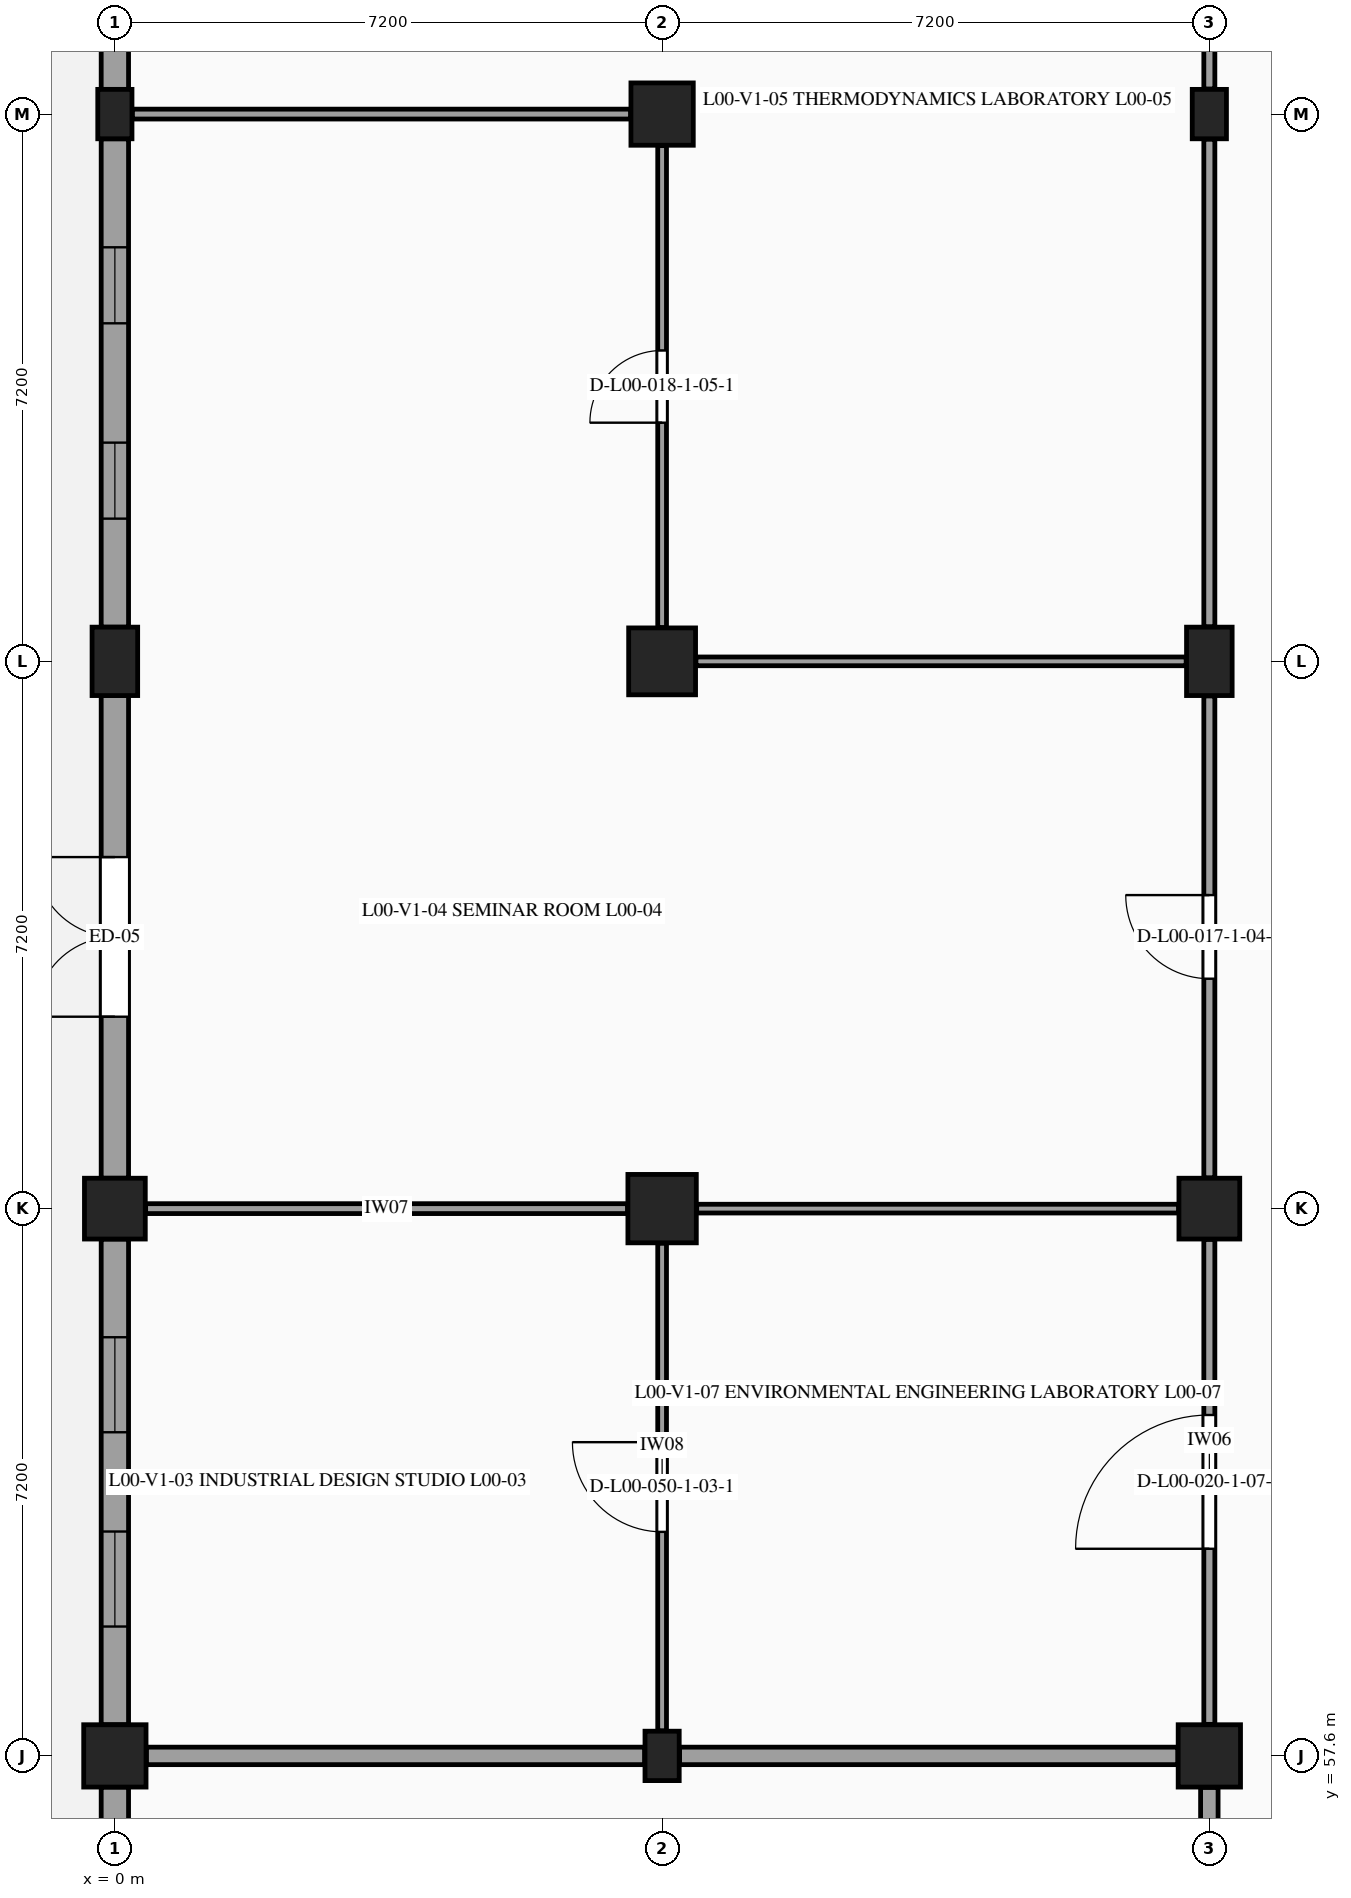
"""IFC4 building model, lengths in metres.
Left out: names, types, materials, properties, quantities, classifications, styles, units other than length and angle.
Written with IfcOpenShell. Run it as: python <this file> out.ifc"""

import sys

from ifc_helpers import new_model, si_unit, direction, frame, frame_2d, origin, origin_2d, place, context, subcontext, project, spatial, rectangle, extrude, element, fill, save


model = new_model("IFC4")
c1 = context("Model", 3, precision=1e-05, world=origin(), true_north=direction((0.0, 1.0)))
c2 = subcontext(c1, "Body", "Model", "MODEL_VIEW")
j1 = project(units=[si_unit("LENGTHUNIT", "METRE"), si_unit("PLANEANGLEUNIT", "RADIAN")], contexts=[c1])
p1 = place(None, origin())
s1 = spatial("IfcSite", under=j1, at=p1, CompositionType="ELEMENT")
p2 = place(p1, origin())
s2 = spatial("IfcBuilding", under=s1, at=p2, CompositionType="ELEMENT")
p3 = place(p2, origin())
s3 = spatial("IfcBuildingStorey", under=s2, at=p3, CompositionType="ELEMENT", Elevation=0.0)
p4 = place(p3, frame((0.0, 57.6, 0.0), z_axis=(0.0, 0.0, 1.0), x_axis=(1.0, 0.0, 0.0)))
e1 = element("IfcColumn", 1, at=p4, inside=s3, PredefinedType="COLUMN", context=c2, shape_type="SweptSolid", body=[
    extrude(rectangle(XDim=0.82, YDim=0.82, at=origin_2d()), origin(), (0.0, 0.0, 1.0), 5.4),
])
p5 = place(p3, frame((0.0, 64.8, 0.0), z_axis=(0.0, 0.0, 1.0), x_axis=(1.0, 0.0, 0.0)))
e2 = element("IfcColumn", 2, at=p5, inside=s3, PredefinedType="COLUMN", context=c2, shape_type="SweptSolid", body=[
    extrude(rectangle(XDim=0.8, YDim=0.8, at=origin_2d()), origin(), (0.0, 0.0, 1.0), 5.4),
])
p6 = place(p3, frame((0.0, 72.0, 0.0), z_axis=(0.0, 0.0, 1.0), x_axis=(1.0, 0.0, 0.0)))
e3 = element("IfcColumn", 3, at=p6, inside=s3, PredefinedType="COLUMN", context=c2, shape_type="SweptSolid", body=[
    extrude(rectangle(XDim=0.6, YDim=0.9, at=origin_2d()), origin(), (0.0, 0.0, 1.0), 5.4),
])
for number, where, z_axis, x_axis in (
    (4, (0.0, 79.2, 0.0), (0.0, 0.0, 1.0), (1.0, 0.0, 0.0)),
    (5, (7.2, 57.6, 0.0), (0.0, 0.0, 1.0), (1.0, 0.0, 0.0)),
):
    element("IfcColumn", number, at=place(p3, frame(where, z_axis=z_axis, x_axis=x_axis)), inside=s3, PredefinedType="PILASTER", context=c2, shape_type="SweptSolid", body=[
        extrude(rectangle(XDim=0.45, YDim=0.65, at=origin_2d()), origin(), (0.0, 0.0, 1.0), 5.4),
    ])
p7 = place(p3, frame((7.2, 64.8, 0.0), z_axis=(0.0, 0.0, 1.0), x_axis=(1.0, 0.0, 0.0)))
e6 = element("IfcColumn", 6, at=p7, inside=s3, PredefinedType="COLUMN", context=c2, shape_type="SweptSolid", body=[
    extrude(rectangle(XDim=0.9, YDim=0.9, at=origin_2d()), origin(), (0.0, 0.0, 1.0), 5.4),
])
p8 = place(p3, frame((7.2, 72.0, 0.0), z_axis=(0.0, 0.0, 1.0), x_axis=(1.0, 0.0, 0.0)))
e7 = element("IfcColumn", 7, at=p8, inside=s3, PredefinedType="COLUMN", context=c2, shape_type="SweptSolid", body=[
    extrude(rectangle(XDim=0.88, YDim=0.88, at=origin_2d()), origin(), (0.0, 0.0, 1.0), 5.4),
])
for number, where, z_axis, x_axis in (
    (8, (7.2, 79.2, 0.0), (0.0, 0.0, 1.0), (1.0, 0.0, 0.0)),
    (9, (14.4, 57.6, 0.0), (0.0, 0.0, 1.0), (1.0, 0.0, 0.0)),
):
    element("IfcColumn", number, at=place(p3, frame(where, z_axis=z_axis, x_axis=x_axis)), inside=s3, PredefinedType="COLUMN", context=c2, shape_type="SweptSolid", body=[
        extrude(rectangle(XDim=0.82, YDim=0.82, at=origin_2d()), origin(), (0.0, 0.0, 1.0), 5.4),
    ])
p9 = place(p3, frame((14.4, 64.8, 0.0), z_axis=(0.0, 0.0, 1.0), x_axis=(1.0, 0.0, 0.0)))
e10 = element("IfcColumn", 10, at=p9, inside=s3, PredefinedType="COLUMN", context=c2, shape_type="SweptSolid", body=[
    extrude(rectangle(XDim=0.8, YDim=0.8, at=origin_2d()), origin(), (0.0, 0.0, 1.0), 5.4),
])
p10 = place(p3, frame((14.4, 72.0, 0.0), z_axis=(0.0, 0.0, 1.0), x_axis=(1.0, 0.0, 0.0)))
e11 = element("IfcColumn", 11, at=p10, inside=s3, PredefinedType="COLUMN", context=c2, shape_type="SweptSolid", body=[
    extrude(rectangle(XDim=0.6, YDim=0.9, at=origin_2d()), origin(), (0.0, 0.0, 1.0), 5.4),
])
p11 = place(p3, frame((14.4, 79.2, 0.0), z_axis=(0.0, 0.0, 1.0), x_axis=(1.0, 0.0, 0.0)))
e12 = element("IfcColumn", 12, at=p11, inside=s3, PredefinedType="PILASTER", context=c2, shape_type="SweptSolid", body=[
    extrude(rectangle(XDim=0.45, YDim=0.65, at=origin_2d()), origin(), (0.0, 0.0, 1.0), 5.4),
])
p12 = place(p3, frame((0.0, 50.84, 0.0), z_axis=(0.0, 0.0, 1.0), x_axis=(0.0, 1.0, 0.0)))
e13 = element("IfcWall", 13, at=p12, inside=s3, PredefinedType="STANDARD", context=c2, shape_type="SweptSolid", body=[
    extrude(rectangle(XDim=6.35, YDim=0.36, at=frame_2d((3.175, 0.0))), origin(), (0.0, 0.0, 1.0), 4.335),
])
p13 = place(p12, frame((2.125, 0.0, 0.0)))
e14 = element("IfcOpeningElement", 14, at=p13, cuts=e13, PredefinedType="OPENING", context=c2, shape_type="SweptSolid", body=[
    extrude(rectangle(XDim=2.1, YDim=2.4, at=frame_2d((1.05, 1.2))), frame((0.0, 0.19, 0.0), z_axis=(0.0, -1.0, 0.0), x_axis=(1.0, 0.0, 0.0)), (0.0, 0.0, 1.0), 0.38),
])
p14 = place(p3, frame((0.0, 58.01, 0.0), z_axis=(0.0, 0.0, 1.0), x_axis=(0.0, 1.0, 0.0)))
e15 = element("IfcWall", 15, at=p14, inside=s3, PredefinedType="STANDARD", context=c2, shape_type="SweptSolid", body=[
    extrude(rectangle(XDim=6.39, YDim=0.36, at=frame_2d((3.195, 0.0))), origin(), (0.0, 0.0, 1.0), 4.335),
])
p15 = place(p14, frame((1.292, 0.0, 1.15)))
e16 = element("IfcOpeningElement", 16, at=p15, cuts=e15, PredefinedType="OPENING", context=c2, shape_type="SweptSolid", body=[
    extrude(rectangle(XDim=1.25, YDim=1.25, at=frame_2d((0.625, 0.625))), frame((0.0, 0.19, 0.0), z_axis=(0.0, -1.0, 0.0), x_axis=(1.0, 0.0, 0.0)), (0.0, 0.0, 1.0), 0.38),
])
p16 = place(p14, frame((3.848, 0.0, 1.15)))
e17 = element("IfcOpeningElement", 17, at=p16, cuts=e15, PredefinedType="OPENING", context=c2, shape_type="SweptSolid", body=[
    extrude(rectangle(XDim=1.25, YDim=1.25, at=frame_2d((0.625, 0.625))), frame((0.0, 0.19, 0.0), z_axis=(0.0, -1.0, 0.0), x_axis=(1.0, 0.0, 0.0)), (0.0, 0.0, 1.0), 0.38),
])
p17 = place(p3, frame((0.0, 65.2, 0.0), z_axis=(0.0, 0.0, 1.0), x_axis=(0.0, 1.0, 0.0)))
e18 = element("IfcWall", 18, at=p17, inside=s3, PredefinedType="STANDARD", context=c2, shape_type="SweptSolid", body=[
    extrude(rectangle(XDim=6.35, YDim=0.36, at=frame_2d((3.175, 0.0))), origin(), (0.0, 0.0, 1.0), 4.335),
])
p18 = place(p17, frame((2.125, 0.0, 0.0)))
e19 = element("IfcOpeningElement", 19, at=p18, cuts=e18, PredefinedType="OPENING", context=c2, shape_type="SweptSolid", body=[
    extrude(rectangle(XDim=2.1, YDim=2.4, at=frame_2d((1.05, 1.2))), frame((0.0, 0.19, 0.0), z_axis=(0.0, -1.0, 0.0), x_axis=(1.0, 0.0, 0.0)), (0.0, 0.0, 1.0), 0.38),
])
p19 = place(p3, frame((0.0, 72.45, 0.0), z_axis=(0.0, 0.0, 1.0), x_axis=(0.0, 1.0, 0.0)))
e20 = element("IfcWall", 20, at=p19, inside=s3, PredefinedType="STANDARD", context=c2, shape_type="SweptSolid", body=[
    extrude(rectangle(XDim=6.425, YDim=0.36, at=frame_2d((3.212, 0.0))), origin(), (0.0, 0.0, 1.0), 4.335),
])
p20 = place(p19, frame((1.427, 0.0, 1.15)))
e21 = element("IfcOpeningElement", 21, at=p20, cuts=e20, PredefinedType="OPENING", context=c2, shape_type="SweptSolid", body=[
    extrude(rectangle(XDim=1.0, YDim=1.2, at=frame_2d((0.5, 0.6))), frame((0.0, 0.19, 0.0), z_axis=(0.0, -1.0, 0.0), x_axis=(1.0, 0.0, 0.0)), (0.0, 0.0, 1.0), 0.38),
])
p21 = place(p19, frame((3.998, 0.0, 1.15)))
e22 = element("IfcOpeningElement", 22, at=p21, cuts=e20, PredefinedType="OPENING", context=c2, shape_type="SweptSolid", body=[
    extrude(rectangle(XDim=1.0, YDim=1.2, at=frame_2d((0.5, 0.6))), frame((0.0, 0.19, 0.0), z_axis=(0.0, -1.0, 0.0), x_axis=(1.0, 0.0, 0.0)), (0.0, 0.0, 1.0), 0.38),
])
p22 = place(p3, frame((0.0, 79.525, 0.0), z_axis=(0.0, 0.0, 1.0), x_axis=(0.0, 1.0, 0.0)))
e23 = element("IfcWall", 23, at=p22, inside=s3, PredefinedType="STANDARD", context=c2, shape_type="SweptSolid", body=[
    extrude(rectangle(XDim=6.425, YDim=0.36, at=frame_2d((3.212, 0.0))), origin(), (0.0, 0.0, 1.0), 4.335),
])
p23 = place(p22, frame((2.163, 0.0, 0.0)))
e24 = element("IfcOpeningElement", 24, at=p23, cuts=e23, PredefinedType="OPENING", context=c2, shape_type="SweptSolid", body=[
    extrude(rectangle(XDim=2.1, YDim=2.4, at=frame_2d((1.05, 1.2))), frame((0.0, 0.19, 0.0), z_axis=(0.0, -1.0, 0.0), x_axis=(1.0, 0.0, 0.0)), (0.0, 0.0, 1.0), 0.38),
])
p24 = place(p3, frame((0.415, 57.6, 0.0), z_axis=(0.0, 0.0, 1.0), x_axis=(1.0, 0.0, 0.0)))
e25 = element("IfcWall", 25, at=p24, inside=s3, PredefinedType="PARTITIONING", context=c2, shape_type="SweptSolid", body=[
    extrude(rectangle(XDim=6.555, YDim=0.23, at=frame_2d((3.277, 0.0))), origin(), (0.0, 0.0, 1.0), 4.31),
])
p25 = place(p3, frame((7.2, 57.93, 0.0), z_axis=(0.0, 0.0, 1.0), x_axis=(0.0, 1.0, 0.0)))
e26 = element("IfcWall", 26, at=p25, inside=s3, PredefinedType="PARTITIONING", context=c2, shape_type="SweptSolid", body=[
    extrude(rectangle(XDim=6.415, YDim=0.115, at=frame_2d((3.208, 0.0))), origin(), (0.0, 0.0, 1.0), 4.405),
])
p26 = place(p25, frame((2.617, 0.0, 0.0)))
e27 = element("IfcOpeningElement", 27, at=p26, cuts=e26, PredefinedType="OPENING", context=c2, shape_type="SweptSolid", body=[
    extrude(rectangle(XDim=1.18, YDim=2.18, at=frame_2d((0.59, 1.09))), frame((0.0, 0.067, 0.0), z_axis=(0.0, -1.0, 0.0), x_axis=(1.0, 0.0, 0.0)), (0.0, 0.0, 1.0), 0.135),
])
p27 = place(p3, frame((0.405, 64.8, 0.0), z_axis=(0.0, 0.0, 1.0), x_axis=(1.0, 0.0, 0.0)))
e28 = element("IfcWall", 28, at=p27, inside=s3, PredefinedType="PARTITIONING", context=c2, shape_type="SweptSolid", body=[
    extrude(rectangle(XDim=6.34, YDim=0.13, at=frame_2d((3.17, 0.0))), origin(), (0.0, 0.0, 1.0), 4.31),
])
p28 = place(p3, frame((7.2, 72.445, 0.0), z_axis=(0.0, 0.0, 1.0), x_axis=(0.0, 1.0, 0.0)))
e29 = element("IfcWall", 29, at=p28, inside=s3, PredefinedType="PARTITIONING", context=c2, shape_type="SweptSolid", body=[
    extrude(rectangle(XDim=6.34, YDim=0.115, at=frame_2d((3.17, 0.0))), origin(), (0.0, 0.0, 1.0), 4.4),
])
p29 = place(p28, frame((2.695, 0.0, 0.0)))
e30 = element("IfcOpeningElement", 30, at=p29, cuts=e29, PredefinedType="OPENING", context=c2, shape_type="SweptSolid", body=[
    extrude(rectangle(XDim=0.95, YDim=2.15, at=frame_2d((0.475, 1.075))), frame((0.0, 0.067, 0.0), z_axis=(0.0, -1.0, 0.0), x_axis=(1.0, 0.0, 0.0)), (0.0, 0.0, 1.0), 0.135),
])
p30 = place(p3, frame((0.23, 79.2, 0.0), z_axis=(0.0, 0.0, 1.0), x_axis=(1.0, 0.0, 0.0)))
e31 = element("IfcWall", 31, at=p30, inside=s3, PredefinedType="PARTITIONING", context=c2, shape_type="SweptSolid", body=[
    extrude(rectangle(XDim=6.555, YDim=0.13, at=frame_2d((3.277, 0.0))), origin(), (0.0, 0.0, 1.0), 4.31),
])
p31 = place(p3, frame((14.4, 50.845, 0.0), z_axis=(0.0, 0.0, 1.0), x_axis=(0.0, 1.0, 0.0)))
e32 = element("IfcWall", 32, at=p31, inside=s3, PredefinedType="PARTITIONING", context=c2, shape_type="SweptSolid", body=[
    extrude(rectangle(XDim=6.34, YDim=0.23, at=frame_2d((3.17, 0.0))), origin(), (0.0, 0.0, 1.0), 4.455),
])
p32 = place(p3, frame((7.43, 57.6, 0.0), z_axis=(0.0, 0.0, 1.0), x_axis=(1.0, 0.0, 0.0)))
e33 = element("IfcWall", 33, at=p32, inside=s3, PredefinedType="PARTITIONING", context=c2, shape_type="SweptSolid", body=[
    extrude(rectangle(XDim=6.555, YDim=0.23, at=frame_2d((3.278, 0.0))), origin(), (0.0, 0.0, 1.0), 4.34),
])
p33 = place(p3, frame((14.4, 58.015, 0.0), z_axis=(0.0, 0.0, 1.0), x_axis=(0.0, 1.0, 0.0)))
e34 = element("IfcWall", 34, at=p33, inside=s3, PredefinedType="PARTITIONING", context=c2, shape_type="SweptSolid", body=[
    extrude(rectangle(XDim=6.38, YDim=0.145, at=frame_2d((3.19, 0.0))), origin(), (0.0, 0.0, 1.0), 4.405),
])
p34 = place(p33, frame((2.31, 0.0, 0.0)))
e35 = element("IfcOpeningElement", 35, at=p34, cuts=e34, PredefinedType="OPENING", context=c2, shape_type="SweptSolid", body=[
    extrude(rectangle(XDim=1.76, YDim=2.3, at=frame_2d((0.88, 1.15))), frame((0.0, 0.083, 0.0), z_axis=(0.0, -1.0, 0.0), x_axis=(1.0, 0.0, 0.0)), (0.0, 0.0, 1.0), 0.165),
])
p35 = place(p3, frame((7.655, 64.8, 0.0), z_axis=(0.0, 0.0, 1.0), x_axis=(1.0, 0.0, 0.0)))
e36 = element("IfcWall", 36, at=p35, inside=s3, PredefinedType="PARTITIONING", context=c2, shape_type="SweptSolid", body=[
    extrude(rectangle(XDim=6.34, YDim=0.115, at=frame_2d((3.17, 0.0))), origin(), (0.0, 0.0, 1.0), 4.34),
])
p36 = place(p3, frame((14.4, 65.205, 0.0), z_axis=(0.0, 0.0, 1.0), x_axis=(0.0, 1.0, 0.0)))
e37 = element("IfcWall", 37, at=p36, inside=s3, PredefinedType="PARTITIONING", context=c2, shape_type="SweptSolid", body=[
    extrude(rectangle(XDim=6.34, YDim=0.145, at=frame_2d((3.17, 0.0))), origin(), (0.0, 0.0, 1.0), 4.405),
])
p37 = place(p36, frame((2.62, 0.0, 0.0)))
e38 = element("IfcOpeningElement", 38, at=p37, cuts=e37, PredefinedType="OPENING", context=c2, shape_type="SweptSolid", body=[
    extrude(rectangle(XDim=1.1, YDim=2.15, at=frame_2d((0.55, 1.075))), frame((0.0, 0.083, 0.0), z_axis=(0.0, -1.0, 0.0), x_axis=(1.0, 0.0, 0.0)), (0.0, 0.0, 1.0), 0.165),
])
p38 = place(p3, frame((7.645, 72.0, 0.0), z_axis=(0.0, 0.0, 1.0), x_axis=(1.0, 0.0, 0.0)))
e39 = element("IfcWall", 39, at=p38, inside=s3, PredefinedType="PARTITIONING", context=c2, shape_type="SweptSolid", body=[
    extrude(rectangle(XDim=6.45, YDim=0.115, at=frame_2d((3.225, 0.0))), origin(), (0.0, 0.0, 1.0), 4.34),
])
p39 = place(p3, frame((14.4, 72.455, 0.0), z_axis=(0.0, 0.0, 1.0), x_axis=(0.0, 1.0, 0.0)))
e40 = element("IfcWall", 40, at=p39, inside=s3, PredefinedType="PARTITIONING", context=c2, shape_type="SweptSolid", body=[
    extrude(rectangle(XDim=6.415, YDim=0.145, at=frame_2d((3.208, 0.0))), origin(), (0.0, 0.0, 1.0), 4.4),
])
p40 = place(p3, frame((14.4, 79.53, 0.0), z_axis=(0.0, 0.0, 1.0), x_axis=(0.0, 1.0, 0.0)))
e41 = element("IfcWall", 41, at=p40, inside=s3, PredefinedType="PARTITIONING", context=c2, shape_type="SweptSolid", body=[
    extrude(rectangle(XDim=6.415, YDim=0.145, at=frame_2d((3.208, 0.0))), origin(), (0.0, 0.0, 1.0), 4.395),
])
p41 = place(p15, origin())
e42 = element("IfcWindow", 42, at=p41, inside=s3, PartitioningType="SINGLE_PANEL", PredefinedType="WINDOW", context=c2, shape_type="SweptSolid", body=[
    extrude(rectangle(XDim=1.25, YDim=1.25, at=frame_2d((0.625, 0.625))), frame((0.0, -0.08, 0.0), z_axis=(0.0, -1.0, 0.0), x_axis=(1.0, 0.0, 0.0)), (0.0, 0.0, 1.0), 0.06),
])
fill(e16, e42)
p42 = place(p16, origin())
e43 = element("IfcWindow", 43, at=p42, inside=s3, PartitioningType="SINGLE_PANEL", PredefinedType="WINDOW", context=c2, shape_type="SweptSolid", body=[
    extrude(rectangle(XDim=1.25, YDim=1.25, at=frame_2d((0.625, 0.625))), frame((0.0, -0.08, 0.0), z_axis=(0.0, -1.0, 0.0), x_axis=(1.0, 0.0, 0.0)), (0.0, 0.0, 1.0), 0.06),
])
fill(e17, e43)
p43 = place(p18, origin())
e44 = element("IfcDoor", 44, at=p43, inside=s3, OperationType="DOUBLE_DOOR_SINGLE_SWING", PredefinedType="DOOR", context=c2, shape_type="SweptSolid", body=[
    extrude(rectangle(XDim=2.1, YDim=2.4, at=frame_2d((1.05, 1.2))), frame((0.0, 0.025, 0.0), z_axis=(0.0, -1.0, 0.0), x_axis=(1.0, 0.0, 0.0)), (0.0, 0.0, 1.0), 0.05),
])
fill(e19, e44)
p44 = place(p20, origin())
e45 = element("IfcWindow", 45, at=p44, inside=s3, PartitioningType="SINGLE_PANEL", PredefinedType="WINDOW", context=c2, shape_type="SweptSolid", body=[
    extrude(rectangle(XDim=1.0, YDim=1.2, at=frame_2d((0.5, 0.6))), frame((0.0, -0.08, 0.0), z_axis=(0.0, -1.0, 0.0), x_axis=(1.0, 0.0, 0.0)), (0.0, 0.0, 1.0), 0.06),
])
fill(e21, e45)
p45 = place(p21, origin())
e46 = element("IfcWindow", 46, at=p45, inside=s3, PartitioningType="SINGLE_PANEL", PredefinedType="WINDOW", context=c2, shape_type="SweptSolid", body=[
    extrude(rectangle(XDim=1.0, YDim=1.2, at=frame_2d((0.5, 0.6))), frame((0.0, -0.08, 0.0), z_axis=(0.0, -1.0, 0.0), x_axis=(1.0, 0.0, 0.0)), (0.0, 0.0, 1.0), 0.06),
])
fill(e22, e46)
p46 = place(p37, origin())
e47 = element("IfcDoor", 47, at=p46, inside=s3, OperationType="SINGLE_SWING_RIGHT", PredefinedType="DOOR", context=c2, shape_type="SweptSolid", body=[
    extrude(rectangle(XDim=1.1, YDim=2.15, at=frame_2d((0.55, 1.075))), frame((0.0, 0.025, 0.0), z_axis=(0.0, -1.0, 0.0), x_axis=(1.0, 0.0, 0.0)), (0.0, 0.0, 1.0), 0.05),
])
fill(e38, e47)
p47 = place(p29, origin())
e48 = element("IfcDoor", 48, at=p47, inside=s3, OperationType="SINGLE_SWING_LEFT", PredefinedType="DOOR", context=c2, shape_type="SweptSolid", body=[
    extrude(rectangle(XDim=0.95, YDim=2.15, at=frame_2d((0.475, 1.075))), frame((0.0, 0.025, 0.0), z_axis=(0.0, -1.0, 0.0), x_axis=(1.0, 0.0, 0.0)), (0.0, 0.0, 1.0), 0.05),
])
fill(e30, e48)
p48 = place(p34, origin())
e49 = element("IfcDoor", 49, at=p48, inside=s3, OperationType="SINGLE_SWING_LEFT", PredefinedType="DOOR", context=c2, shape_type="SweptSolid", body=[
    extrude(rectangle(XDim=1.76, YDim=2.3, at=frame_2d((0.88, 1.15))), frame((0.0, 0.025, 0.0), z_axis=(0.0, -1.0, 0.0), x_axis=(1.0, 0.0, 0.0)), (0.0, 0.0, 1.0), 0.05),
])
fill(e35, e49)
p49 = place(p26, origin())
e50 = element("IfcDoor", 50, at=p49, inside=s3, OperationType="SINGLE_SWING_RIGHT", PredefinedType="DOOR", context=c2, shape_type="SweptSolid", body=[
    extrude(rectangle(XDim=1.18, YDim=2.18, at=frame_2d((0.59, 1.09))), frame((0.0, 0.025, 0.0), z_axis=(0.0, -1.0, 0.0), x_axis=(1.0, 0.0, 0.0)), (0.0, 0.0, 1.0), 0.05),
])
fill(e27, e50)
save(model, sys.argv[1])
